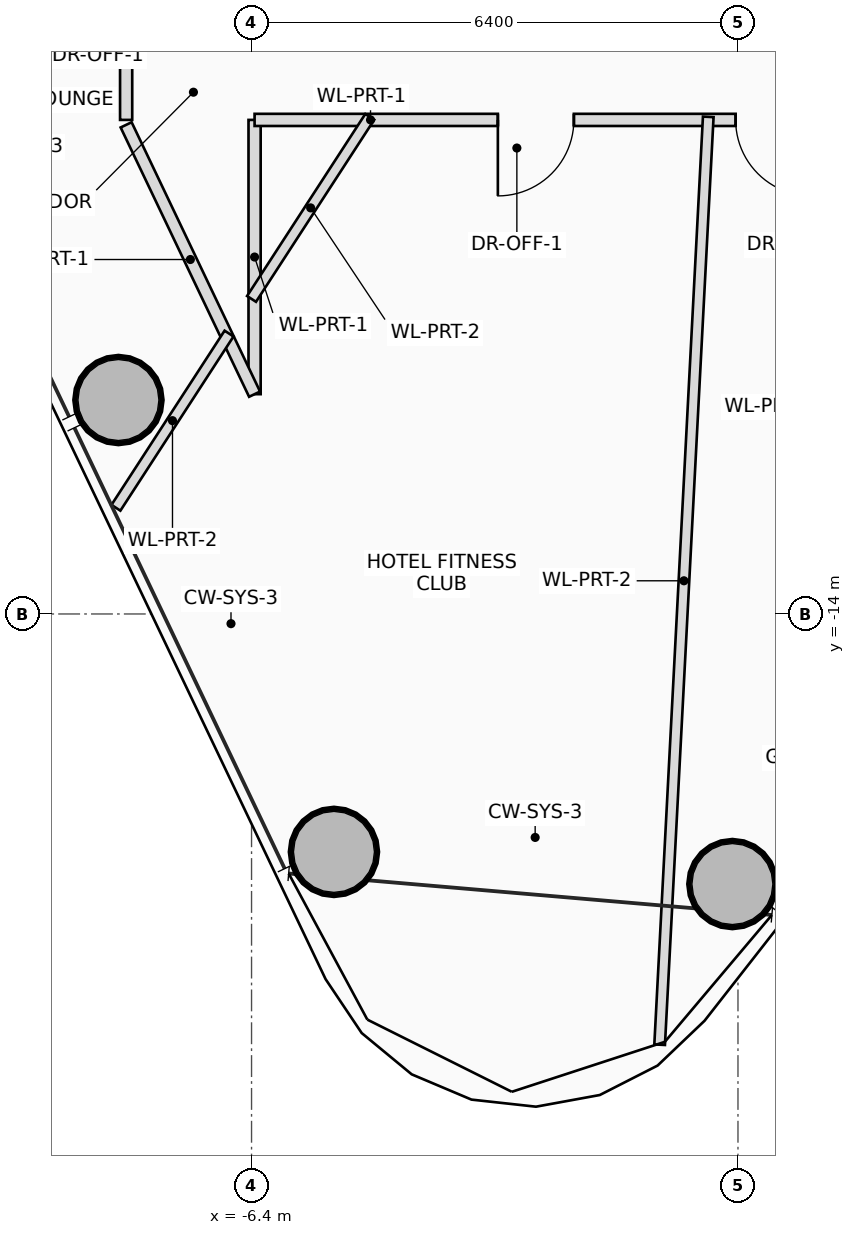
"""IFC4 building model, lengths in metres.
Left out: names, types, materials, properties, quantities, classifications, styles, units other than length and angle.
Written with IfcOpenShell. Run it as: python <this file> out.ifc"""

import sys

from ifc_helpers import new_model, si_unit, direction, frame, frame_2d, origin, origin_2d, place, context, subcontext, project, spatial, rectangle, hollow_circle, extrude, source, transform, mapped, element, fill, save


model = new_model("IFC4")
c1 = context("Model", 3, precision=1e-05, world=origin(), true_north=direction((0.0, 1.0)))
c2 = subcontext(c1, "Body", "Model", "MODEL_VIEW")
j1 = project(units=[si_unit("LENGTHUNIT", "METRE"), si_unit("PLANEANGLEUNIT", "RADIAN")], contexts=[c1])
p1 = place(None, origin())
s1 = spatial("IfcSite", under=j1, at=p1, CompositionType="ELEMENT")
p2 = place(p1, origin())
s2 = spatial("IfcBuilding", under=s1, at=p2, CompositionType="ELEMENT")
p3 = place(p2, frame((0.0, 0.0, 191.45)))
s3 = spatial("IfcBuildingStorey", under=s2, at=p3, CompositionType="ELEMENT", Elevation=191.45)
m1 = source(origin(), c2, "Body", "SweptSolid", [
    extrude(hollow_circle(Radius=0.575, WallThickness=0.042, at=origin_2d()), origin(), (0.0, 0.0, 1.0), 3.45),
])
for number, where, z_axis, x_axis in (
    (1, (-0.073, -17.553, 0.0), (0.0, 0.0, 1.0), (1.0, 0.0, 0.0)),
    (2, (-8.151, -11.185, 0.0), (0.0, 0.0, 1.0), (1.0, 0.0, 0.0)),
    (3, (-5.316, -17.13, 0.0), (0.0, 0.0, 1.0), (1.0, 0.0, 0.0)),
):
    element("IfcColumn", number, at=place(p3, frame(where, z_axis=z_axis, x_axis=x_axis)), inside=s3, PredefinedType="COLUMN", context=c2, shape_type="MappedRepresentation", body=[
        mapped(m1, transform((0.0, 0.0, 0.0), scale=1.0)),
    ])
p4 = place(p3, frame((-6.36, -7.5, 0.0), z_axis=(0.0, 0.0, 1.0), x_axis=(0.0, -1.0, 0.0)))
e4 = element("IfcWall", 4, at=p4, inside=s3, PredefinedType="PARTITIONING", context=c2, shape_type="SweptSolid", body=[
    extrude(rectangle(XDim=3.608, YDim=0.16, at=frame_2d((1.804, 0.0))), origin(), (0.0, 0.0, 1.0), 3.25),
])
p5 = place(p3, frame((-6.36, -11.108, 0.0), z_axis=(0.0, 0.0, 1.0), x_axis=(-0.430493571255, 0.902593643401, 0.0)))
e5 = element("IfcWall", 5, at=p5, inside=s3, PredefinedType="PARTITIONING", context=c2, shape_type="SweptSolid", body=[
    extrude(rectangle(XDim=3.926, YDim=0.16, at=frame_2d((1.963, 0.0))), origin(), (0.0, 0.0, 1.0), 2.605),
])
p6 = place(p3, frame((-8.05, -7.5, 0.0), z_axis=(0.0, 0.0, 1.0), x_axis=(0.0, 1.0, 0.0)))
e6 = element("IfcWall", 6, at=p6, inside=s3, PredefinedType="PARTITIONING", context=c2, shape_type="SweptSolid", body=[
    extrude(rectangle(XDim=15.0, YDim=0.16, at=frame_2d((7.5, 0.0))), origin(), (0.0, 0.0, 1.0), 2.605),
])
p7 = place(p6, frame((2.177, 0.0, 0.0)))
e7 = element("IfcOpeningElement", 7, at=p7, cuts=e6, PredefinedType="OPENING", context=c2, shape_type="SweptSolid", body=[
    extrude(rectangle(XDim=1.0, YDim=2.25, at=frame_2d((0.5, 1.125))), frame((0.0, 0.09, 0.0), z_axis=(0.0, -1.0, 0.0), x_axis=(1.0, 0.0, 0.0)), (0.0, 0.0, 1.0), 0.18),
])
p8 = place(p6, frame((5.453, 0.0, 0.0)))
e8 = element("IfcOpeningElement", 8, at=p8, cuts=e6, PredefinedType="OPENING", context=c2, shape_type="SweptSolid", body=[
    extrude(rectangle(XDim=0.9, YDim=2.05, at=frame_2d((0.45, 1.025))), frame((0.0, 0.09, 0.0), z_axis=(0.0, -1.0, 0.0), x_axis=(1.0, 0.0, 0.0)), (0.0, 0.0, 1.0), 0.18),
])
p9 = place(p6, frame((8.707, 0.0, 0.0)))
e9 = element("IfcOpeningElement", 9, at=p9, cuts=e6, PredefinedType="OPENING", context=c2, shape_type="SweptSolid", body=[
    extrude(rectangle(XDim=1.05, YDim=2.2, at=frame_2d((0.525, 1.1))), frame((0.0, 0.09, 0.0), z_axis=(0.0, -1.0, 0.0), x_axis=(1.0, 0.0, 0.0)), (0.0, 0.0, 1.0), 0.18),
])
p10 = place(p6, frame((12.397, 0.0, 0.0)))
e10 = element("IfcOpeningElement", 10, at=p10, cuts=e6, PredefinedType="OPENING", context=c2, shape_type="SweptSolid", body=[
    extrude(rectangle(XDim=1.0, YDim=2.25, at=frame_2d((0.5, 1.125))), frame((0.0, 0.09, 0.0), z_axis=(0.0, -1.0, 0.0), x_axis=(1.0, 0.0, 0.0)), (0.0, 0.0, 1.0), 0.18),
])
p11 = place(p3, frame((5.25, -7.5, 0.0), z_axis=(0.0, 0.0, 1.0), x_axis=(-1.0, 0.0, 0.0)))
e11 = element("IfcWall", 11, at=p11, inside=s3, PredefinedType="PARTITIONING", context=c2, shape_type="SweptSolid", body=[
    extrude(rectangle(XDim=11.61, YDim=0.16, at=frame_2d((5.805, 0.0))), origin(), (0.0, 0.0, 1.0), 2.605),
])
p12 = place(p11, frame((1.525, 0.0, 0.0)))
e12 = element("IfcOpeningElement", 12, at=p12, cuts=e11, PredefinedType="OPENING", context=c2, shape_type="SweptSolid", body=[
    extrude(rectangle(XDim=1.05, YDim=2.2, at=frame_2d((0.525, 1.1))), frame((0.0, 0.09, 0.0), z_axis=(0.0, -1.0, 0.0), x_axis=(1.0, 0.0, 0.0)), (0.0, 0.0, 1.0), 0.18),
])
p13 = place(p11, frame((4.281, 0.0, 0.0)))
e13 = element("IfcOpeningElement", 13, at=p13, cuts=e11, PredefinedType="OPENING", context=c2, shape_type="SweptSolid", body=[
    extrude(rectangle(XDim=1.0, YDim=2.25, at=frame_2d((0.5, 1.125))), frame((0.0, 0.09, 0.0), z_axis=(0.0, -1.0, 0.0), x_axis=(1.0, 0.0, 0.0)), (0.0, 0.0, 1.0), 0.18),
])
p14 = place(p11, frame((7.409, 0.0, 0.0)))
e14 = element("IfcOpeningElement", 14, at=p14, cuts=e11, PredefinedType="OPENING", context=c2, shape_type="SweptSolid", body=[
    extrude(rectangle(XDim=1.0, YDim=2.25, at=frame_2d((0.5, 1.125))), frame((0.0, 0.09, 0.0), z_axis=(0.0, -1.0, 0.0), x_axis=(1.0, 0.0, 0.0)), (0.0, 0.0, 1.0), 0.18),
])
p15 = place(p3, frame((-4.844, -7.46, 0.0), z_axis=(0.0, 0.0, 1.0), x_axis=(-0.544657766351, -0.838658403376, 0.0)))
e15 = element("IfcWall", 15, at=p15, inside=s3, PredefinedType="PARTITIONING", context=c2, shape_type="SweptSolid", body=[
    extrude(rectangle(XDim=2.856, YDim=0.14, at=frame_2d((1.428, 0.0))), origin(), (0.0, 0.0, 1.0), 2.605),
])
p16 = place(p3, frame((-6.696, -10.311, 0.0), z_axis=(0.0, 0.0, 1.0), x_axis=(-0.54459891399, -0.838696621479, 0.0)))
e16 = element("IfcWall", 16, at=p16, inside=s3, PredefinedType="PARTITIONING", context=c2, shape_type="SweptSolid", body=[
    extrude(rectangle(XDim=2.733, YDim=0.14, at=frame_2d((1.366, 0.0))), origin(), (0.0, 0.0, 1.0), 2.765),
])
p17 = place(p3, frame((-0.391, -7.46, 0.0), z_axis=(0.0, 0.0, 1.0), x_axis=(-0.052329252614, -0.998629886054, 0.0)))
e17 = element("IfcWall", 17, at=p17, inside=s3, PredefinedType="PARTITIONING", context=c2, shape_type="SweptSolid", body=[
    extrude(rectangle(XDim=12.224, YDim=0.14, at=frame_2d((6.112, 0.0))), origin(), (0.0, 0.0, 1.0), 2.605),
])
p18 = place(p13, origin())
e18 = element("IfcDoor", 18, at=p18, inside=s3, OperationType="SINGLE_SWING_LEFT", PredefinedType="DOOR", context=c2, shape_type="SweptSolid", body=[
    extrude(rectangle(XDim=1.0, YDim=2.25, at=frame_2d((0.5, 1.125))), frame((0.0, 0.025, 0.0), z_axis=(0.0, -1.0, 0.0), x_axis=(1.0, 0.0, 0.0)), (0.0, 0.0, 1.0), 0.05),
])
fill(e13, e18)
p19 = place(p14, origin())
e19 = element("IfcDoor", 19, at=p19, inside=s3, OperationType="SINGLE_SWING_RIGHT", PredefinedType="DOOR", context=c2, shape_type="SweptSolid", body=[
    extrude(rectangle(XDim=1.0, YDim=2.25, at=frame_2d((0.5, 1.125))), frame((0.0, 0.025, 0.0), z_axis=(0.0, -1.0, 0.0), x_axis=(1.0, 0.0, 0.0)), (0.0, 0.0, 1.0), 0.05),
])
fill(e14, e19)
save(model, sys.argv[1])
